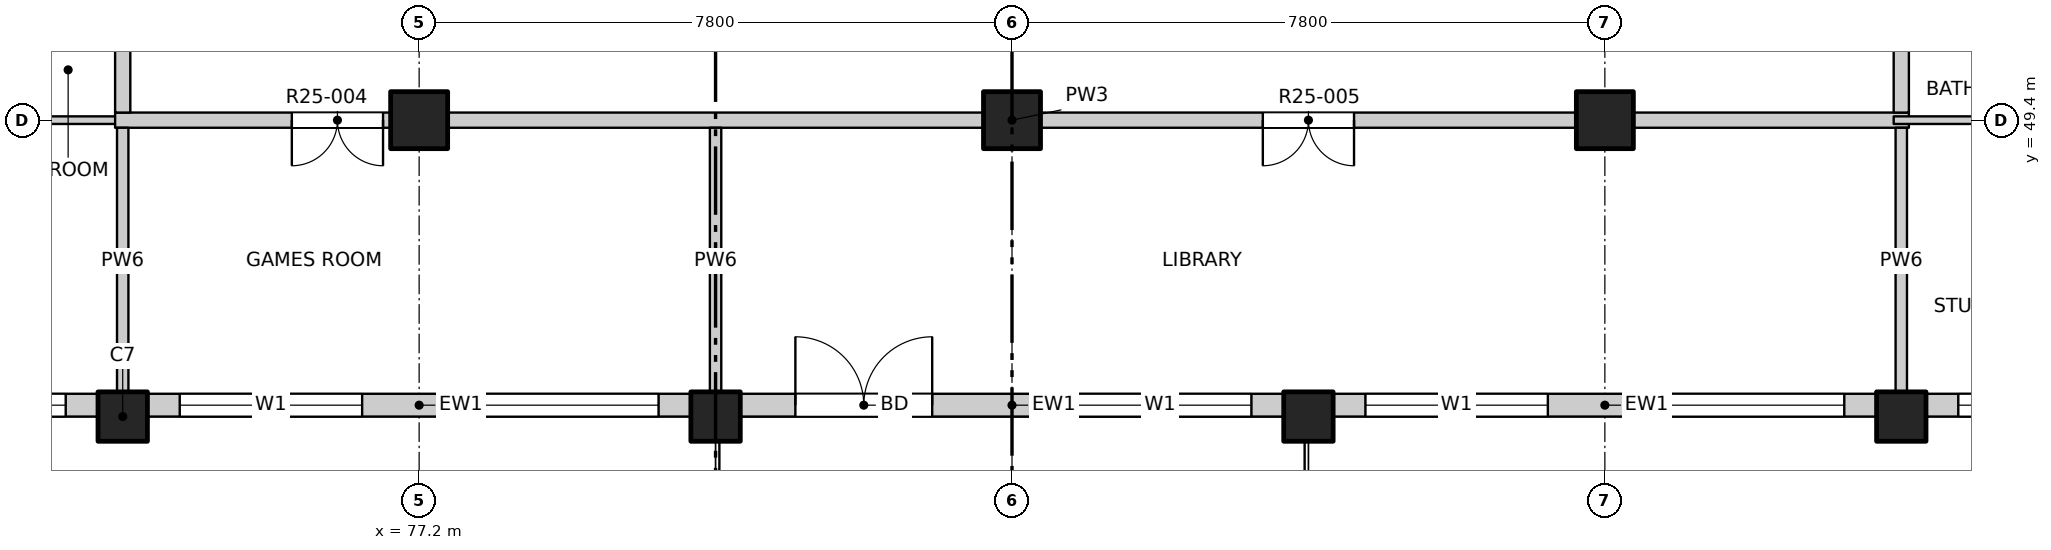
"""IFC4 building model, lengths in metres.
Left out: names, types, materials, properties, quantities, classifications, styles, units other than length and angle.
Written with IfcOpenShell. Run it as: python <this file> out.ifc"""

import sys

from ifc_helpers import new_model, si_unit, direction, frame, frame_2d, origin, origin_2d, place, context, subcontext, project, spatial, rectangle, extrude, element, fill, save


model = new_model("IFC4")
c1 = context("Model", 3, precision=1e-05, world=origin(), true_north=direction((0.0, 1.0)))
c2 = subcontext(c1, "Body", "Model", "MODEL_VIEW")
j1 = project(units=[si_unit("LENGTHUNIT", "METRE"), si_unit("PLANEANGLEUNIT", "RADIAN")], contexts=[c1])
p1 = place(None, origin())
s1 = spatial("IfcSite", under=j1, at=p1, CompositionType="ELEMENT")
p2 = place(p1, origin())
s2 = spatial("IfcBuilding", under=s1, at=p2, CompositionType="ELEMENT")
p3 = place(p2, frame((0.0, 0.0, 252.8)))
s3 = spatial("IfcBuildingStorey", under=s2, at=p3, CompositionType="ELEMENT", Elevation=252.8)
for number, where, z_axis, x_axis in (
    (1, (73.3, 45.5, -0.25), (0.0, 0.0, 1.0), (1.0, 0.0, 0.0)),
    (2, (81.1, 45.5, -0.25), (0.0, 0.0, 1.0), (1.0, 0.0, 0.0)),
    (3, (88.9, 45.5, -0.25), (0.0, 0.0, 1.0), (1.0, 0.0, 0.0)),
    (4, (96.7, 45.5, -0.25), (0.0, 0.0, 1.0), (1.0, 0.0, 0.0)),
):
    element("IfcColumn", number, at=place(p3, frame(where, z_axis=z_axis, x_axis=x_axis)), inside=s3, PredefinedType="COLUMN", context=c2, shape_type="SweptSolid", body=[
        extrude(rectangle(XDim=0.65, YDim=0.65, at=origin_2d()), origin(), (0.0, 0.0, 1.0), 3.4),
    ])
for number, where, z_axis, x_axis in (
    (5, (77.2, 49.4, -0.25), (0.0, 0.0, 1.0), (1.0, 0.0, 0.0)),
    (6, (85.0, 49.4, -0.25), (0.0, 0.0, 1.0), (1.0, 0.0, 0.0)),
    (7, (92.8, 49.4, -0.25), (0.0, 0.0, 1.0), (1.0, 0.0, 0.0)),
):
    element("IfcColumn", number, at=place(p3, frame(where, z_axis=z_axis, x_axis=x_axis)), inside=s3, PredefinedType="COLUMN", context=c2, shape_type="SweptSolid", body=[
        extrude(rectangle(XDim=0.75, YDim=0.75, at=origin_2d()), origin(), (0.0, 0.0, 1.0), 3.4),
    ])
p4 = place(p3, frame((69.4, 45.65, 0.0), z_axis=(0.0, 0.0, 1.0), x_axis=(1.0, 0.0, 0.0)))
e8 = element("IfcWall", 8, at=p4, inside=s3, PredefinedType="SOLIDWALL", context=c2, shape_type="SweptSolid", body=[
    extrude(rectangle(XDim=3.575, YDim=0.3, at=frame_2d((1.788, 0.0))), origin(), (0.0, 0.0, 1.0), 2.7),
])
p5 = place(p4, frame((0.75, 0.0, 0.9)))
e9 = element("IfcOpeningElement", 9, at=p5, cuts=e8, PredefinedType="OPENING", context=c2, shape_type="SweptSolid", body=[
    extrude(rectangle(XDim=2.4, YDim=1.8, at=frame_2d((1.2, 0.9))), frame((0.0, 0.16, 0.0), z_axis=(0.0, -1.0, 0.0), x_axis=(1.0, 0.0, 0.0)), (0.0, 0.0, 1.0), 0.32),
])
p6 = place(p3, frame((73.625, 45.65, 0.0), z_axis=(0.0, 0.0, 1.0), x_axis=(1.0, 0.0, 0.0)))
e10 = element("IfcWall", 10, at=p6, inside=s3, PredefinedType="SOLIDWALL", context=c2, shape_type="SweptSolid", body=[
    extrude(rectangle(XDim=7.15, YDim=0.3, at=frame_2d((3.575, 0.0))), origin(), (0.0, 0.0, 1.0), 2.7),
])
p7 = place(p6, frame((0.425, 0.0, 0.9)))
e11 = element("IfcOpeningElement", 11, at=p7, cuts=e10, PredefinedType="OPENING", context=c2, shape_type="SweptSolid", body=[
    extrude(rectangle(XDim=2.4, YDim=1.8, at=frame_2d((1.2, 0.9))), frame((0.0, 0.16, 0.0), z_axis=(0.0, -1.0, 0.0), x_axis=(1.0, 0.0, 0.0)), (0.0, 0.0, 1.0), 0.32),
])
p8 = place(p6, frame((4.325, 0.0, 0.9)))
e12 = element("IfcOpeningElement", 12, at=p8, cuts=e10, PredefinedType="OPENING", context=c2, shape_type="SweptSolid", body=[
    extrude(rectangle(XDim=2.4, YDim=1.8, at=frame_2d((1.2, 0.9))), frame((0.0, 0.16, 0.0), z_axis=(0.0, -1.0, 0.0), x_axis=(1.0, 0.0, 0.0)), (0.0, 0.0, 1.0), 0.32),
])
p9 = place(p3, frame((81.425, 45.65, 0.0), z_axis=(0.0, 0.0, 1.0), x_axis=(1.0, 0.0, 0.0)))
e13 = element("IfcWall", 13, at=p9, inside=s3, PredefinedType="SOLIDWALL", context=c2, shape_type="SweptSolid", body=[
    extrude(rectangle(XDim=7.15, YDim=0.3, at=frame_2d((3.575, 0.0))), origin(), (0.0, 0.0, 1.0), 2.7),
])
p10 = place(p9, frame((0.725, 0.0, 0.0)))
e14 = element("IfcOpeningElement", 14, at=p10, cuts=e13, PredefinedType="OPENING", context=c2, shape_type="SweptSolid", body=[
    extrude(rectangle(XDim=1.8, YDim=2.4, at=frame_2d((0.9, 1.2))), frame((0.0, 0.16, 0.0), z_axis=(0.0, -1.0, 0.0), x_axis=(1.0, 0.0, 0.0)), (0.0, 0.0, 1.0), 0.32),
])
p11 = place(p9, frame((4.325, 0.0, 0.9)))
e15 = element("IfcOpeningElement", 15, at=p11, cuts=e13, PredefinedType="OPENING", context=c2, shape_type="SweptSolid", body=[
    extrude(rectangle(XDim=2.4, YDim=1.8, at=frame_2d((1.2, 0.9))), frame((0.0, 0.16, 0.0), z_axis=(0.0, -1.0, 0.0), x_axis=(1.0, 0.0, 0.0)), (0.0, 0.0, 1.0), 0.32),
])
p12 = place(p3, frame((89.225, 45.65, 0.0), z_axis=(0.0, 0.0, 1.0), x_axis=(1.0, 0.0, 0.0)))
e16 = element("IfcWall", 16, at=p12, inside=s3, PredefinedType="SOLIDWALL", context=c2, shape_type="SweptSolid", body=[
    extrude(rectangle(XDim=7.15, YDim=0.3, at=frame_2d((3.575, 0.0))), origin(), (0.0, 0.0, 1.0), 2.7),
])
p13 = place(p12, frame((0.425, 0.0, 0.9)))
e17 = element("IfcOpeningElement", 17, at=p13, cuts=e16, PredefinedType="OPENING", context=c2, shape_type="SweptSolid", body=[
    extrude(rectangle(XDim=2.4, YDim=1.8, at=frame_2d((1.2, 0.9))), frame((0.0, 0.16, 0.0), z_axis=(0.0, -1.0, 0.0), x_axis=(1.0, 0.0, 0.0)), (0.0, 0.0, 1.0), 0.32),
])
p14 = place(p12, frame((4.325, 0.0, 0.9)))
e18 = element("IfcOpeningElement", 18, at=p14, cuts=e16, PredefinedType="OPENING", context=c2, shape_type="SweptSolid", body=[
    extrude(rectangle(XDim=2.4, YDim=1.8, at=frame_2d((1.2, 0.9))), frame((0.0, 0.16, 0.0), z_axis=(0.0, -1.0, 0.0), x_axis=(1.0, 0.0, 0.0)), (0.0, 0.0, 1.0), 0.32),
])
p15 = place(p3, frame((97.025, 45.65, 0.0), z_axis=(0.0, 0.0, 1.0), x_axis=(1.0, 0.0, 0.0)))
e19 = element("IfcWall", 19, at=p15, inside=s3, PredefinedType="SOLIDWALL", context=c2, shape_type="SweptSolid", body=[
    extrude(rectangle(XDim=3.575, YDim=0.3, at=frame_2d((1.788, 0.0))), origin(), (0.0, 0.0, 1.0), 2.7),
])
p16 = place(p15, frame((0.425, 0.0, 0.9)))
e20 = element("IfcOpeningElement", 20, at=p16, cuts=e19, PredefinedType="OPENING", context=c2, shape_type="SweptSolid", body=[
    extrude(rectangle(XDim=2.4, YDim=1.8, at=frame_2d((1.2, 0.9))), frame((0.0, 0.16, 0.0), z_axis=(0.0, -1.0, 0.0), x_axis=(1.0, 0.0, 0.0)), (0.0, 0.0, 1.0), 0.32),
])
p17 = place(p3, frame((65.8, 49.4, 0.0), z_axis=(0.0, 0.0, 1.0), x_axis=(1.0, 0.0, 0.0)))
e21 = element("IfcWall", 21, at=p17, inside=s3, PredefinedType="PARTITIONING", context=c2, shape_type="SweptSolid", body=[
    extrude(rectangle(XDim=7.6, YDim=0.1, at=frame_2d((3.8, 0.0))), origin(), (0.0, 0.0, 1.0), 3.15),
])
p18 = place(p17, frame((4.09, 0.0, 0.0)))
e22 = element("IfcOpeningElement", 22, at=p18, cuts=e21, PredefinedType="OPENING", context=c2, shape_type="SweptSolid", body=[
    extrude(rectangle(XDim=0.9, YDim=2.1, at=frame_2d((0.45, 1.05))), frame((0.0, 0.06, 0.0), z_axis=(0.0, -1.0, 0.0), x_axis=(1.0, 0.0, 0.0)), (0.0, 0.0, 1.0), 0.12),
])
p19 = place(p3, frame((73.2, 49.4, 0.0), z_axis=(0.0, 0.0, 1.0), x_axis=(1.0, 0.0, 0.0)))
e23 = element("IfcWall", 23, at=p19, inside=s3, PredefinedType="PARTITIONING", context=c2, shape_type="SweptSolid", body=[
    extrude(rectangle(XDim=23.6, YDim=0.2, at=frame_2d((11.8, 0.0))), origin(), (0.0, 0.0, 1.0), 3.15),
])
p20 = place(p19, frame((2.325, 0.0, 0.0)))
e24 = element("IfcOpeningElement", 24, at=p20, cuts=e23, PredefinedType="OPENING", context=c2, shape_type="SweptSolid", body=[
    extrude(rectangle(XDim=1.2, YDim=2.1, at=frame_2d((0.6, 1.05))), frame((0.0, 0.11, 0.0), z_axis=(0.0, -1.0, 0.0), x_axis=(1.0, 0.0, 0.0)), (0.0, 0.0, 1.0), 0.22),
])
p21 = place(p19, frame((15.1, 0.0, 0.0)))
e25 = element("IfcOpeningElement", 25, at=p21, cuts=e23, PredefinedType="OPENING", context=c2, shape_type="SweptSolid", body=[
    extrude(rectangle(XDim=1.2, YDim=2.1, at=frame_2d((0.6, 1.05))), frame((0.0, 0.11, 0.0), z_axis=(0.0, -1.0, 0.0), x_axis=(1.0, 0.0, 0.0)), (0.0, 0.0, 1.0), 0.22),
])
p22 = place(p3, frame((96.6, 49.4, 0.0), z_axis=(0.0, 0.0, 1.0), x_axis=(1.0, 0.0, 0.0)))
e26 = element("IfcWall", 26, at=p22, inside=s3, PredefinedType="PARTITIONING", context=c2, shape_type="SweptSolid", body=[
    extrude(rectangle(XDim=7.6, YDim=0.1, at=frame_2d((3.8, 0.0))), origin(), (0.0, 0.0, 1.0), 3.15),
])
p23 = place(p22, frame((2.61, 0.0, 0.0)))
e27 = element("IfcOpeningElement", 27, at=p23, cuts=e26, PredefinedType="OPENING", context=c2, shape_type="SweptSolid", body=[
    extrude(rectangle(XDim=0.9, YDim=2.1, at=frame_2d((0.45, 1.05))), frame((0.0, 0.06, 0.0), z_axis=(0.0, -1.0, 0.0), x_axis=(1.0, 0.0, 0.0)), (0.0, 0.0, 1.0), 0.12),
])
p24 = place(p3, frame((73.3, 45.8, 0.0), z_axis=(0.0, 0.0, 1.0), x_axis=(0.0, 1.0, 0.0)))
e28 = element("IfcWall", 28, at=p24, inside=s3, PredefinedType="PARTITIONING", context=c2, shape_type="SweptSolid", body=[
    extrude(rectangle(XDim=3.5, YDim=0.15, at=frame_2d((1.75, 0.0))), origin(), (0.0, 0.0, 1.0), 3.15),
])
p25 = place(p3, frame((73.3, 49.5, 0.0), z_axis=(0.0, 0.0, 1.0), x_axis=(0.0, 1.0, 0.0)))
e29 = element("IfcWall", 29, at=p25, inside=s3, PredefinedType="PARTITIONING", context=c2, shape_type="SweptSolid", body=[
    extrude(rectangle(XDim=34.7, YDim=0.2, at=frame_2d((17.35, 0.0))), origin(), (0.0, 0.0, 1.0), 3.15),
])
p26 = place(p25, frame((10.175, 0.0, 0.0)))
e30 = element("IfcOpeningElement", 30, at=p26, cuts=e29, PredefinedType="OPENING", context=c2, shape_type="SweptSolid", body=[
    extrude(rectangle(XDim=1.0, YDim=2.1, at=frame_2d((0.5, 1.05))), frame((0.0, 0.11, 0.0), z_axis=(0.0, -1.0, 0.0), x_axis=(1.0, 0.0, 0.0)), (0.0, 0.0, 1.0), 0.22),
])
p27 = place(p25, frame((21.475, 0.0, 0.0)))
e31 = element("IfcOpeningElement", 31, at=p27, cuts=e29, PredefinedType="OPENING", context=c2, shape_type="SweptSolid", body=[
    extrude(rectangle(XDim=1.0, YDim=2.1, at=frame_2d((0.5, 1.05))), frame((0.0, 0.11, 0.0), z_axis=(0.0, -1.0, 0.0), x_axis=(1.0, 0.0, 0.0)), (0.0, 0.0, 1.0), 0.22),
])
p28 = place(p25, frame((29.875, 0.0, 0.0)))
e32 = element("IfcOpeningElement", 32, at=p28, cuts=e29, PredefinedType="OPENING", context=c2, shape_type="SweptSolid", body=[
    extrude(rectangle(XDim=1.0, YDim=2.1, at=frame_2d((0.5, 1.05))), frame((0.0, 0.11, 0.0), z_axis=(0.0, -1.0, 0.0), x_axis=(1.0, 0.0, 0.0)), (0.0, 0.0, 1.0), 0.22),
])
p29 = place(p3, frame((81.1, 45.8, 0.0), z_axis=(0.0, 0.0, 1.0), x_axis=(0.0, 1.0, 0.0)))
e33 = element("IfcWall", 33, at=p29, inside=s3, PredefinedType="PARTITIONING", context=c2, shape_type="SweptSolid", body=[
    extrude(rectangle(XDim=3.5, YDim=0.15, at=frame_2d((1.75, 0.0))), origin(), (0.0, 0.0, 1.0), 2.55),
])
p30 = place(p3, frame((96.7, 45.8, 0.0), z_axis=(0.0, 0.0, 1.0), x_axis=(0.0, 1.0, 0.0)))
e34 = element("IfcWall", 34, at=p30, inside=s3, PredefinedType="PARTITIONING", context=c2, shape_type="SweptSolid", body=[
    extrude(rectangle(XDim=3.5, YDim=0.15, at=frame_2d((1.75, 0.0))), origin(), (0.0, 0.0, 1.0), 3.15),
])
p31 = place(p3, frame((96.7, 49.5, 0.0), z_axis=(0.0, 0.0, 1.0), x_axis=(0.0, 1.0, 0.0)))
e35 = element("IfcWall", 35, at=p31, inside=s3, PredefinedType="PARTITIONING", context=c2, shape_type="SweptSolid", body=[
    extrude(rectangle(XDim=34.7, YDim=0.2, at=frame_2d((17.35, 0.0))), origin(), (0.0, 0.0, 1.0), 3.15),
])
p32 = place(p31, frame((6.575, 0.0, 0.0)))
e36 = element("IfcOpeningElement", 36, at=p32, cuts=e35, PredefinedType="OPENING", context=c2, shape_type="SweptSolid", body=[
    extrude(rectangle(XDim=1.0, YDim=2.1, at=frame_2d((0.5, 1.05))), frame((0.0, 0.11, 0.0), z_axis=(0.0, -1.0, 0.0), x_axis=(1.0, 0.0, 0.0)), (0.0, 0.0, 1.0), 0.22),
])
p33 = place(p31, frame((13.975, 0.0, 0.0)))
e37 = element("IfcOpeningElement", 37, at=p33, cuts=e35, PredefinedType="OPENING", context=c2, shape_type="SweptSolid", body=[
    extrude(rectangle(XDim=1.0, YDim=2.1, at=frame_2d((0.5, 1.05))), frame((0.0, 0.11, 0.0), z_axis=(0.0, -1.0, 0.0), x_axis=(1.0, 0.0, 0.0)), (0.0, 0.0, 1.0), 0.22),
])
p34 = place(p31, frame((26.525, 0.0, 0.0)))
e38 = element("IfcOpeningElement", 38, at=p34, cuts=e35, PredefinedType="OPENING", context=c2, shape_type="SweptSolid", body=[
    extrude(rectangle(XDim=1.0, YDim=2.1, at=frame_2d((0.5, 1.05))), frame((0.0, 0.11, 0.0), z_axis=(0.0, -1.0, 0.0), x_axis=(1.0, 0.0, 0.0)), (0.0, 0.0, 1.0), 0.22),
])
p35 = place(p5, origin())
e39 = element("IfcWindow", 39, at=p35, inside=s3, PartitioningType="DOUBLE_PANEL_VERTICAL", PredefinedType="WINDOW", context=c2, shape_type="SweptSolid", body=[
    extrude(rectangle(XDim=2.4, YDim=1.8, at=frame_2d((1.2, 0.9))), frame((0.0, 0.03, 0.0), z_axis=(0.0, -1.0, 0.0), x_axis=(1.0, 0.0, 0.0)), (0.0, 0.0, 1.0), 0.06),
])
fill(e9, e39)
p36 = place(p7, origin())
e40 = element("IfcWindow", 40, at=p36, inside=s3, PartitioningType="DOUBLE_PANEL_VERTICAL", PredefinedType="WINDOW", context=c2, shape_type="SweptSolid", body=[
    extrude(rectangle(XDim=2.4, YDim=1.8, at=frame_2d((1.2, 0.9))), frame((0.0, 0.03, 0.0), z_axis=(0.0, -1.0, 0.0), x_axis=(1.0, 0.0, 0.0)), (0.0, 0.0, 1.0), 0.06),
])
fill(e11, e40)
p37 = place(p8, origin())
e41 = element("IfcWindow", 41, at=p37, inside=s3, PartitioningType="DOUBLE_PANEL_VERTICAL", PredefinedType="WINDOW", context=c2, shape_type="SweptSolid", body=[
    extrude(rectangle(XDim=2.4, YDim=1.8, at=frame_2d((1.2, 0.9))), frame((0.0, 0.03, 0.0), z_axis=(0.0, -1.0, 0.0), x_axis=(1.0, 0.0, 0.0)), (0.0, 0.0, 1.0), 0.06),
])
fill(e12, e41)
p38 = place(p10, origin())
e42 = element("IfcDoor", 42, at=p38, inside=s3, OperationType="DOUBLE_DOOR_SINGLE_SWING", PredefinedType="DOOR", context=c2, shape_type="SweptSolid", body=[
    extrude(rectangle(XDim=1.8, YDim=2.4, at=frame_2d((0.9, 1.2))), frame((0.0, 0.025, 0.0), z_axis=(0.0, -1.0, 0.0), x_axis=(1.0, 0.0, 0.0)), (0.0, 0.0, 1.0), 0.05),
])
fill(e14, e42)
p39 = place(p11, origin())
e43 = element("IfcWindow", 43, at=p39, inside=s3, PartitioningType="DOUBLE_PANEL_VERTICAL", PredefinedType="WINDOW", context=c2, shape_type="SweptSolid", body=[
    extrude(rectangle(XDim=2.4, YDim=1.8, at=frame_2d((1.2, 0.9))), frame((0.0, 0.03, 0.0), z_axis=(0.0, -1.0, 0.0), x_axis=(1.0, 0.0, 0.0)), (0.0, 0.0, 1.0), 0.06),
])
fill(e15, e43)
p40 = place(p13, origin())
e44 = element("IfcWindow", 44, at=p40, inside=s3, PartitioningType="DOUBLE_PANEL_VERTICAL", PredefinedType="WINDOW", context=c2, shape_type="SweptSolid", body=[
    extrude(rectangle(XDim=2.4, YDim=1.8, at=frame_2d((1.2, 0.9))), frame((0.0, 0.03, 0.0), z_axis=(0.0, -1.0, 0.0), x_axis=(1.0, 0.0, 0.0)), (0.0, 0.0, 1.0), 0.06),
])
fill(e17, e44)
p41 = place(p14, origin())
e45 = element("IfcWindow", 45, at=p41, inside=s3, PartitioningType="DOUBLE_PANEL_VERTICAL", PredefinedType="WINDOW", context=c2, shape_type="SweptSolid", body=[
    extrude(rectangle(XDim=2.4, YDim=1.8, at=frame_2d((1.2, 0.9))), frame((0.0, 0.03, 0.0), z_axis=(0.0, -1.0, 0.0), x_axis=(1.0, 0.0, 0.0)), (0.0, 0.0, 1.0), 0.06),
])
fill(e18, e45)
p42 = place(p16, origin())
e46 = element("IfcWindow", 46, at=p42, inside=s3, PartitioningType="DOUBLE_PANEL_VERTICAL", PredefinedType="WINDOW", context=c2, shape_type="SweptSolid", body=[
    extrude(rectangle(XDim=2.4, YDim=1.8, at=frame_2d((1.2, 0.9))), frame((0.0, 0.03, 0.0), z_axis=(0.0, -1.0, 0.0), x_axis=(1.0, 0.0, 0.0)), (0.0, 0.0, 1.0), 0.06),
])
fill(e20, e46)
p43 = place(p20, origin())
e47 = element("IfcDoor", 47, at=p43, inside=s3, OperationType="DOUBLE_DOOR_SINGLE_SWING", PredefinedType="DOOR", context=c2, shape_type="SweptSolid", body=[
    extrude(rectangle(XDim=1.2, YDim=2.1, at=frame_2d((0.6, 1.05))), frame((0.0, 0.025, 0.0), z_axis=(0.0, -1.0, 0.0), x_axis=(1.0, 0.0, 0.0)), (0.0, 0.0, 1.0), 0.05),
])
fill(e24, e47)
p44 = place(p21, origin())
e48 = element("IfcDoor", 48, at=p44, inside=s3, OperationType="DOUBLE_DOOR_SINGLE_SWING", PredefinedType="DOOR", context=c2, shape_type="SweptSolid", body=[
    extrude(rectangle(XDim=1.2, YDim=2.1, at=frame_2d((0.6, 1.05))), frame((0.0, 0.025, 0.0), z_axis=(0.0, -1.0, 0.0), x_axis=(1.0, 0.0, 0.0)), (0.0, 0.0, 1.0), 0.05),
])
fill(e25, e48)
save(model, sys.argv[1])
